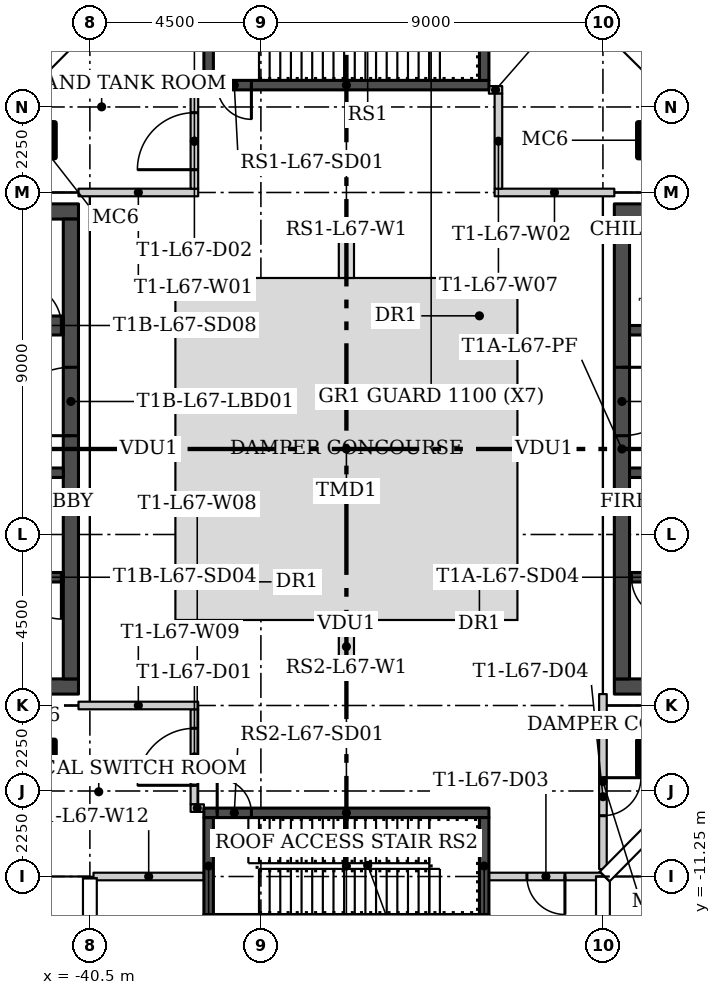
"""IFC4 building model, lengths in metres.
Left out: names, types, materials, properties, quantities, classifications, styles, units other than length and angle.
Written with IfcOpenShell. Run it as: python <this file> out.ifc"""

import sys

from ifc_helpers import new_model, si_unit, direction, frame, frame_2d, origin, origin_2d, place, context, subcontext, project, spatial, rectangle, hollow_rectangle, extrude, element, fill, save


model = new_model("IFC4")
c1 = context("Model", 3, precision=1e-05, world=origin(), true_north=direction((0.0, 1.0)))
c2 = subcontext(c1, "Body", "Model", "MODEL_VIEW")
j1 = project(units=[si_unit("LENGTHUNIT", "METRE"), si_unit("PLANEANGLEUNIT", "RADIAN")], contexts=[c1])
p1 = place(None, origin())
s1 = spatial("IfcSite", under=j1, at=p1, CompositionType="ELEMENT")
p2 = place(p1, origin())
s2 = spatial("IfcBuilding", under=s1, at=p2, CompositionType="ELEMENT")
p3 = place(p2, frame((0.0, 0.0, 278.3)))
s3 = spatial("IfcBuildingStorey", under=s2, at=p3, CompositionType="ELEMENT", Elevation=278.3)
for number, where in (
    (1, (-25.625, 8.125, 0.0)),
    (2, (-25.625, -8.125, 0.0)),
    (3, (-41.875, 8.125, 0.0)),
    (4, (-41.875, -8.125, 0.0)),
):
    element("IfcColumn", number, at=place(p3, frame(where)), inside=s3, PredefinedType="COLUMN", context=c2, shape_type="SweptSolid", body=[
        extrude(hollow_rectangle(XDim=0.9, YDim=0.9, WallThickness=0.036, at=origin_2d()), origin(), (0.0, 0.0, 1.0), 5.55),
    ])
for number, where in (
    (5, (-40.8, 6.75, 0.0)),
    (6, (-29.85, 6.75, 0.0)),
):
    element("IfcWall", number, at=place(p3, frame(where)), inside=s3, PredefinedType="PARTITIONING", context=c2, shape_type="SweptSolid", body=[
        extrude(rectangle(XDim=3.15, YDim=0.2, at=frame_2d((1.575, 0.0))), origin(), (0.0, 0.0, 1.0), 5.55),
    ])
p4 = place(p3, frame((-37.75, -9.35, 0.0), z_axis=(0.0, 0.0, 1.0), x_axis=(0.0, 1.0, 0.0)))
e7 = element("IfcWall", 7, at=p4, inside=s3, PredefinedType="PARTITIONING", context=c2, shape_type="SweptSolid", body=[
    extrude(rectangle(XDim=2.5, YDim=0.2, at=frame_2d((1.25, 0.0))), origin(), (0.0, 0.0, 1.0), 5.55),
])
p5 = place(p4, frame((0.5, 0.0, 0.0)))
e8 = element("IfcOpeningElement", 8, at=p5, cuts=e7, PredefinedType="OPENING", context=c2, shape_type="SweptSolid", body=[
    extrude(rectangle(XDim=1.5, YDim=2.4, at=frame_2d((0.75, 1.2))), frame((0.0, 0.11, 0.0), z_axis=(0.0, -1.0, 0.0), x_axis=(1.0, 0.0, 0.0)), (0.0, 0.0, 1.0), 0.22),
])
p6 = place(p3, frame((-37.75, 6.85, 0.0), z_axis=(0.0, 0.0, 1.0), x_axis=(0.0, 1.0, 0.0)))
e9 = element("IfcWall", 9, at=p6, inside=s3, PredefinedType="PARTITIONING", context=c2, shape_type="SweptSolid", body=[
    extrude(rectangle(XDim=2.5, YDim=0.2, at=frame_2d((1.25, 0.0))), origin(), (0.0, 0.0, 1.0), 5.55),
])
p7 = place(p6, frame((0.5, 0.0, 0.0)))
e10 = element("IfcOpeningElement", 10, at=p7, cuts=e9, PredefinedType="OPENING", context=c2, shape_type="SweptSolid", body=[
    extrude(rectangle(XDim=1.5, YDim=2.4, at=frame_2d((0.75, 1.2))), frame((0.0, 0.11, 0.0), z_axis=(0.0, -1.0, 0.0), x_axis=(1.0, 0.0, 0.0)), (0.0, 0.0, 1.0), 0.22),
])
for number, where in (
    (11, (-37.85, 9.45, 0.0)),
    (12, (-30.0, 9.45, 0.0)),
):
    element("IfcWall", number, at=place(p3, frame(where)), inside=s3, PredefinedType="PARTITIONING", context=c2, shape_type="SweptSolid", body=[
        extrude(rectangle(XDim=0.35, YDim=0.2, at=frame_2d((0.175, 0.0))), origin(), (0.0, 0.0, 1.0), 5.55),
    ])
p8 = place(p3, frame((-29.75, 9.35, 0.0), z_axis=(0.0, 0.0, 1.0), x_axis=(0.0, -1.0, 0.0)))
e13 = element("IfcWall", 13, at=p8, inside=s3, PredefinedType="PARTITIONING", context=c2, shape_type="SweptSolid", body=[
    extrude(rectangle(XDim=2.5, YDim=0.2, at=frame_2d((1.25, 0.0))), origin(), (0.0, 0.0, 1.0), 5.55),
])
p9 = place(p3, frame((-37.5, -9.45, 0.0), z_axis=(0.0, 0.0, 1.0), x_axis=(-1.0, 0.0, 0.0)))
e14 = element("IfcWall", 14, at=p9, inside=s3, PredefinedType="PARTITIONING", context=c2, shape_type="SweptSolid", body=[
    extrude(rectangle(XDim=0.35, YDim=0.2, at=frame_2d((0.175, 0.0))), origin(), (0.0, 0.0, 1.0), 5.55),
])
p10 = place(p3, frame((-37.65, -6.75, 0.0), z_axis=(0.0, 0.0, 1.0), x_axis=(-1.0, 0.0, 0.0)))
e15 = element("IfcWall", 15, at=p10, inside=s3, PredefinedType="PARTITIONING", context=c2, shape_type="SweptSolid", body=[
    extrude(rectangle(XDim=3.15, YDim=0.2, at=frame_2d((1.575, 0.0))), origin(), (0.0, 0.0, 1.0), 5.55),
])
p11 = place(p3, frame((-26.995, -11.25, 0.0), z_axis=(0.0, 0.0, 1.0), x_axis=(-1.0, 0.0, 0.0)))
e16 = element("IfcWall", 16, at=p11, inside=s3, PredefinedType="PARTITIONING", context=c2, shape_type="SweptSolid", body=[
    extrude(rectangle(XDim=3.005, YDim=0.2, at=frame_2d((1.502, 0.0))), origin(), (0.0, 0.0, 1.0), 5.55),
])
p12 = place(p11, frame((1.005, 0.0, 0.0)))
e17 = element("IfcOpeningElement", 17, at=p12, cuts=e16, PredefinedType="OPENING", context=c2, shape_type="SweptSolid", body=[
    extrude(rectangle(XDim=1.0, YDim=2.1, at=frame_2d((0.5, 1.05))), frame((0.0, 0.11, 0.0), z_axis=(0.0, -1.0, 0.0), x_axis=(1.0, 0.0, 0.0)), (0.0, 0.0, 1.0), 0.22),
])
p13 = place(p3, frame((-27.0, -6.45, 0.0), z_axis=(0.0, 0.0, 1.0), x_axis=(0.0, -1.0, 0.0)))
e18 = element("IfcWall", 18, at=p13, inside=s3, PredefinedType="PARTITIONING", context=c2, shape_type="SweptSolid", body=[
    extrude(rectangle(XDim=4.605, YDim=0.2, at=frame_2d((2.302, 0.0))), origin(), (0.0, 0.0, 1.0), 5.55),
])
p14 = place(p13, frame((2.2, 0.0, 0.0)))
e19 = element("IfcOpeningElement", 19, at=p14, cuts=e18, PredefinedType="OPENING", context=c2, shape_type="SweptSolid", body=[
    extrude(rectangle(XDim=1.0, YDim=2.1, at=frame_2d((0.5, 1.05))), frame((0.0, 0.11, 0.0), z_axis=(0.0, -1.0, 0.0), x_axis=(1.0, 0.0, 0.0)), (0.0, 0.0, 1.0), 0.22),
])
p15 = place(p3, frame((-40.405, -11.25, 0.0)))
e20 = element("IfcWall", 20, at=p15, inside=s3, PredefinedType="PARTITIONING", context=c2, shape_type="SweptSolid", body=[
    extrude(rectangle(XDim=2.905, YDim=0.2, at=frame_2d((1.453, 0.0))), origin(), (0.0, 0.0, 1.0), 5.55),
])
for number, where in (
    (21, (-26.7, -6.25, 0.0)),
    (22, (-26.7, 6.25, 0.0)),
):
    element("IfcWall", number, at=place(p3, frame(where)), inside=s3, PredefinedType="SHEAR", context=c2, shape_type="SweptSolid", body=[
        extrude(rectangle(XDim=12.9, YDim=0.4, at=frame_2d((6.45, 0.0))), origin(), (0.0, 0.0, 1.0), 5.55),
    ])
p16 = place(p3, frame((-26.5, 6.05, 0.0), z_axis=(0.0, 0.0, 1.0), x_axis=(0.0, -1.0, 0.0)))
e23 = element("IfcWall", 23, at=p16, inside=s3, PredefinedType="SHEAR", context=c2, shape_type="SweptSolid", body=[
    extrude(rectangle(XDim=12.1, YDim=0.4, at=frame_2d((6.05, 0.0))), origin(), (0.0, 0.0, 1.0), 5.55),
])
p17 = place(p16, frame((3.9, 0.0, 0.0)))
e24 = element("IfcOpeningElement", 24, at=p17, cuts=e23, PredefinedType="OPENING", context=c2, shape_type="SweptSolid", body=[
    extrude(rectangle(XDim=1.8, YDim=2.4, at=frame_2d((0.9, 1.2))), frame((0.0, 0.21, 0.0), z_axis=(0.0, -1.0, 0.0), x_axis=(1.0, 0.0, 0.0)), (0.0, 0.0, 1.0), 0.42),
])
p18 = place(p3, frame((-14.2, -3.375, 0.0), z_axis=(0.0, 0.0, 1.0), x_axis=(-1.0, 0.0, 0.0)))
e25 = element("IfcWall", 25, at=p18, inside=s3, PredefinedType="SHEAR", context=c2, shape_type="SweptSolid", body=[
    extrude(rectangle(XDim=12.1, YDim=0.25, at=frame_2d((6.05, 0.0))), origin(), (0.0, 0.0, 1.0), 5.55),
])
p19 = place(p18, frame((10.95, 0.0, 0.0)))
e26 = element("IfcOpeningElement", 26, at=p19, cuts=e25, PredefinedType="OPENING", context=c2, shape_type="SweptSolid", body=[
    extrude(rectangle(XDim=1.1, YDim=2.1, at=frame_2d((0.55, 1.05))), frame((0.0, 0.135, 0.0), z_axis=(0.0, -1.0, 0.0), x_axis=(1.0, 0.0, 0.0)), (0.0, 0.0, 1.0), 0.27),
])
p20 = place(p3, frame((-14.2, -0.625, 0.0), z_axis=(0.0, 0.0, 1.0), x_axis=(-1.0, 0.0, 0.0)))
e27 = element("IfcWall", 27, at=p20, inside=s3, PredefinedType="SHEAR", context=c2, shape_type="SweptSolid", body=[
    extrude(rectangle(XDim=12.1, YDim=0.25, at=frame_2d((6.05, 0.0))), origin(), (0.0, 0.0, 1.0), 5.55),
])
p21 = place(p20, frame((8.65, 0.0, 0.0)))
e28 = element("IfcOpeningElement", 28, at=p21, cuts=e27, PredefinedType="OPENING", context=c2, shape_type="SweptSolid", body=[
    extrude(rectangle(XDim=1.2, YDim=2.1, at=frame_2d((0.6, 1.05))), frame((0.0, 0.135, 0.0), z_axis=(0.0, -1.0, 0.0), x_axis=(1.0, 0.0, 0.0)), (0.0, 0.0, 1.0), 0.27),
])
p22 = place(p20, frame((1.175, 0.0, 0.0)))
e29 = element("IfcOpeningElement", 29, at=p22, cuts=e27, PredefinedType="OPENING", context=c2, shape_type="SweptSolid", body=[
    extrude(rectangle(XDim=0.9, YDim=2.1, at=frame_2d((0.45, 1.05))), frame((0.0, 0.135, 0.0), z_axis=(0.0, -1.0, 0.0), x_axis=(1.0, 0.0, 0.0)), (0.0, 0.0, 1.0), 0.27),
])
p23 = place(p3, frame((-26.3, 3.125, 0.0)))
e30 = element("IfcWall", 30, at=p23, inside=s3, PredefinedType="SHEAR", context=c2, shape_type="SweptSolid", body=[
    extrude(rectangle(XDim=12.1, YDim=0.25, at=frame_2d((6.05, 0.0))), origin(), (0.0, 0.0, 1.0), 5.55),
])
p24 = place(p23, frame((6.95, 0.0, 0.0)))
e31 = element("IfcOpeningElement", 31, at=p24, cuts=e30, PredefinedType="OPENING", context=c2, shape_type="SweptSolid", body=[
    extrude(rectangle(XDim=1.1, YDim=2.1, at=frame_2d((0.55, 1.05))), frame((0.0, 0.135, 0.0), z_axis=(0.0, -1.0, 0.0), x_axis=(1.0, 0.0, 0.0)), (0.0, 0.0, 1.0), 0.27),
])
p25 = place(p23, frame((10.075, 0.0, 0.0)))
e32 = element("IfcOpeningElement", 32, at=p25, cuts=e30, PredefinedType="OPENING", context=c2, shape_type="SweptSolid", body=[
    extrude(rectangle(XDim=1.1, YDim=2.1, at=frame_2d((0.55, 1.05))), frame((0.0, 0.135, 0.0), z_axis=(0.0, -1.0, 0.0), x_axis=(1.0, 0.0, 0.0)), (0.0, 0.0, 1.0), 0.27),
])
p26 = place(p23, frame((1.65, 0.0, 0.0)))
e33 = element("IfcOpeningElement", 33, at=p26, cuts=e30, PredefinedType="OPENING", context=c2, shape_type="SweptSolid", body=[
    extrude(rectangle(XDim=0.9, YDim=2.1, at=frame_2d((0.45, 1.05))), frame((0.0, 0.135, 0.0), z_axis=(0.0, -1.0, 0.0), x_axis=(1.0, 0.0, 0.0)), (0.0, 0.0, 1.0), 0.27),
])
p27 = place(p23, frame((4.575, 0.0, 0.0)))
e34 = element("IfcOpeningElement", 34, at=p27, cuts=e30, PredefinedType="OPENING", context=c2, shape_type="SweptSolid", body=[
    extrude(rectangle(XDim=0.9, YDim=2.1, at=frame_2d((0.45, 1.05))), frame((0.0, 0.135, 0.0), z_axis=(0.0, -1.0, 0.0), x_axis=(1.0, 0.0, 0.0)), (0.0, 0.0, 1.0), 0.27),
])
for number, where, z_axis, x_axis in (
    (35, (-40.8, -6.25, 0.0), (0.0, 0.0, 1.0), (-1.0, 0.0, 0.0)),
    (36, (-40.8, 6.25, 0.0), (0.0, 0.0, 1.0), (-1.0, 0.0, 0.0)),
):
    element("IfcWall", number, at=place(p3, frame(where, z_axis=z_axis, x_axis=x_axis)), inside=s3, PredefinedType="SHEAR", context=c2, shape_type="SweptSolid", body=[
        extrude(rectangle(XDim=12.9, YDim=0.4, at=frame_2d((6.45, 0.0))), origin(), (0.0, 0.0, 1.0), 5.55),
    ])
p28 = place(p3, frame((-41.0, -6.05, 0.0), z_axis=(0.0, 0.0, 1.0), x_axis=(0.0, 1.0, 0.0)))
e37 = element("IfcWall", 37, at=p28, inside=s3, PredefinedType="SHEAR", context=c2, shape_type="SweptSolid", body=[
    extrude(rectangle(XDim=12.1, YDim=0.4, at=frame_2d((6.05, 0.0))), origin(), (0.0, 0.0, 1.0), 5.55),
])
p29 = place(p28, frame((6.4, 0.0, 0.0)))
e38 = element("IfcOpeningElement", 38, at=p29, cuts=e37, PredefinedType="OPENING", context=c2, shape_type="SweptSolid", body=[
    extrude(rectangle(XDim=1.8, YDim=2.4, at=frame_2d((0.9, 1.2))), frame((0.0, 0.21, 0.0), z_axis=(0.0, -1.0, 0.0), x_axis=(1.0, 0.0, 0.0)), (0.0, 0.0, 1.0), 0.42),
])
p30 = place(p3, frame((-41.2, -3.375, 0.0), z_axis=(0.0, 0.0, 1.0), x_axis=(-1.0, 0.0, 0.0)))
e39 = element("IfcWall", 39, at=p30, inside=s3, PredefinedType="SHEAR", context=c2, shape_type="SweptSolid", body=[
    extrude(rectangle(XDim=12.1, YDim=0.25, at=frame_2d((6.05, 0.0))), origin(), (0.0, 0.0, 1.0), 5.55),
])
p31 = place(p30, frame((0.05, 0.0, 0.0)))
e40 = element("IfcOpeningElement", 40, at=p31, cuts=e39, PredefinedType="OPENING", context=c2, shape_type="SweptSolid", body=[
    extrude(rectangle(XDim=1.1, YDim=2.1, at=frame_2d((0.55, 1.05))), frame((0.0, 0.135, 0.0), z_axis=(0.0, -1.0, 0.0), x_axis=(1.0, 0.0, 0.0)), (0.0, 0.0, 1.0), 0.27),
])
p32 = place(p3, frame((-41.2, -0.625, 0.0), z_axis=(0.0, 0.0, 1.0), x_axis=(-1.0, 0.0, 0.0)))
e41 = element("IfcWall", 41, at=p32, inside=s3, PredefinedType="SHEAR", context=c2, shape_type="SweptSolid", body=[
    extrude(rectangle(XDim=12.1, YDim=0.25, at=frame_2d((6.05, 0.0))), origin(), (0.0, 0.0, 1.0), 5.55),
])
p33 = place(p32, frame((2.25, 0.0, 0.0)))
e42 = element("IfcOpeningElement", 42, at=p33, cuts=e41, PredefinedType="OPENING", context=c2, shape_type="SweptSolid", body=[
    extrude(rectangle(XDim=1.2, YDim=2.1, at=frame_2d((0.6, 1.05))), frame((0.0, 0.135, 0.0), z_axis=(0.0, -1.0, 0.0), x_axis=(1.0, 0.0, 0.0)), (0.0, 0.0, 1.0), 0.27),
])
p34 = place(p32, frame((10.025, 0.0, 0.0)))
e43 = element("IfcOpeningElement", 43, at=p34, cuts=e41, PredefinedType="OPENING", context=c2, shape_type="SweptSolid", body=[
    extrude(rectangle(XDim=0.9, YDim=2.1, at=frame_2d((0.45, 1.05))), frame((0.0, 0.135, 0.0), z_axis=(0.0, -1.0, 0.0), x_axis=(1.0, 0.0, 0.0)), (0.0, 0.0, 1.0), 0.27),
])
p35 = place(p3, frame((-48.5, 3.25, 0.0)))
e44 = element("IfcWall", 44, at=p35, inside=s3, PredefinedType="SHEAR", context=c2, shape_type="SweptSolid", body=[
    extrude(rectangle(XDim=7.3, YDim=0.5, at=frame_2d((3.65, 0.0))), origin(), (0.0, 0.0, 1.0), 5.55),
])
p36 = place(p35, frame((6.15, 0.0, 0.0)))
e45 = element("IfcOpeningElement", 45, at=p36, cuts=e44, PredefinedType="OPENING", context=c2, shape_type="SweptSolid", body=[
    extrude(rectangle(XDim=1.1, YDim=2.1, at=frame_2d((0.55, 1.05))), frame((0.0, 0.26, 0.0), z_axis=(0.0, -1.0, 0.0), x_axis=(1.0, 0.0, 0.0)), (0.0, 0.0, 1.0), 0.52),
])
p37 = place(p3, frame((-30.0, 9.575, 0.0), z_axis=(0.0, 0.0, 1.0), x_axis=(-1.0, 0.0, 0.0)))
e46 = element("IfcWall", 46, at=p37, inside=s3, PredefinedType="SHEAR", context=c2, shape_type="SweptSolid", body=[
    extrude(rectangle(XDim=7.5, YDim=0.25, at=frame_2d((3.75, 0.0))), origin(), (0.0, 0.0, 1.0), 5.55),
])
p38 = place(p37, frame((6.25, 0.0, 0.0)))
e47 = element("IfcOpeningElement", 47, at=p38, cuts=e46, PredefinedType="OPENING", context=c2, shape_type="SweptSolid", body=[
    extrude(rectangle(XDim=0.9, YDim=2.1, at=frame_2d((0.45, 1.05))), frame((0.0, 0.135, 0.0), z_axis=(0.0, -1.0, 0.0), x_axis=(1.0, 0.0, 0.0)), (0.0, 0.0, 1.0), 0.27),
])
for number, where, z_axis, x_axis in (
    (48, (-37.375, 9.7, 0.0), (0.0, 0.0, 1.0), (0.0, 1.0, 0.0)),
    (49, (-30.125, 9.7, 0.0), (0.0, 0.0, 1.0), (0.0, 1.0, 0.0)),
):
    element("IfcWall", number, at=place(p3, frame(where, z_axis=z_axis, x_axis=x_axis)), inside=s3, PredefinedType="SHEAR", context=c2, shape_type="SweptSolid", body=[
        extrude(rectangle(XDim=2.55, YDim=0.25, at=frame_2d((1.275, 0.0))), origin(), (0.0, 0.0, 1.0), 5.55),
    ])
p39 = place(p3, frame((-37.5, -9.575, 0.0)))
e50 = element("IfcWall", 50, at=p39, inside=s3, PredefinedType="SHEAR", context=c2, shape_type="SweptSolid", body=[
    extrude(rectangle(XDim=7.5, YDim=0.25, at=frame_2d((3.75, 0.0))), origin(), (0.0, 0.0, 1.0), 5.55),
])
p40 = place(p39, frame((0.35, 0.0, 0.0)))
e51 = element("IfcOpeningElement", 51, at=p40, cuts=e50, PredefinedType="OPENING", context=c2, shape_type="SweptSolid", body=[
    extrude(rectangle(XDim=0.9, YDim=2.1, at=frame_2d((0.45, 1.05))), frame((0.0, 0.135, 0.0), z_axis=(0.0, -1.0, 0.0), x_axis=(1.0, 0.0, 0.0)), (0.0, 0.0, 1.0), 0.27),
])
for number, where, z_axis, x_axis in (
    (52, (-37.375, -12.25, 0.0), (0.0, 0.0, 1.0), (0.0, 1.0, 0.0)),
    (53, (-30.125, -12.25, 0.0), (0.0, 0.0, 1.0), (0.0, 1.0, 0.0)),
):
    element("IfcWall", number, at=place(p3, frame(where, z_axis=z_axis, x_axis=x_axis)), inside=s3, PredefinedType="SHEAR", context=c2, shape_type="SweptSolid", body=[
        extrude(rectangle(XDim=2.55, YDim=0.25, at=frame_2d((1.275, 0.0))), origin(), (0.0, 0.0, 1.0), 5.55),
    ])
p41 = place(p5, origin())
e54 = element("IfcDoor", 54, at=p41, inside=s3, OperationType="DOUBLE_DOOR_SINGLE_SWING", PredefinedType="DOOR", context=c2, shape_type="SweptSolid", body=[
    extrude(rectangle(XDim=1.5, YDim=2.4, at=frame_2d((0.75, 1.2))), frame((0.0, 0.025, 0.0), z_axis=(0.0, -1.0, 0.0), x_axis=(1.0, 0.0, 0.0)), (0.0, 0.0, 1.0), 0.05),
])
fill(e8, e54)
p42 = place(p7, origin())
e55 = element("IfcDoor", 55, at=p42, inside=s3, OperationType="DOUBLE_DOOR_SINGLE_SWING", PredefinedType="DOOR", context=c2, shape_type="SweptSolid", body=[
    extrude(rectangle(XDim=1.5, YDim=2.4, at=frame_2d((0.75, 1.2))), frame((0.0, 0.025, 0.0), z_axis=(0.0, -1.0, 0.0), x_axis=(1.0, 0.0, 0.0)), (0.0, 0.0, 1.0), 0.05),
])
fill(e10, e55)
p43 = place(p12, origin())
e56 = element("IfcDoor", 56, at=p43, inside=s3, OperationType="SINGLE_SWING_LEFT", PredefinedType="DOOR", context=c2, shape_type="SweptSolid", body=[
    extrude(rectangle(XDim=1.0, YDim=2.1, at=frame_2d((0.5, 1.05))), frame((0.0, 0.025, 0.0), z_axis=(0.0, -1.0, 0.0), x_axis=(1.0, 0.0, 0.0)), (0.0, 0.0, 1.0), 0.05),
])
fill(e17, e56)
p44 = place(p14, origin())
e57 = element("IfcDoor", 57, at=p44, inside=s3, OperationType="SINGLE_SWING_RIGHT", PredefinedType="DOOR", context=c2, shape_type="SweptSolid", body=[
    extrude(rectangle(XDim=1.0, YDim=2.1, at=frame_2d((0.5, 1.05))), frame((0.0, 0.025, 0.0), z_axis=(0.0, -1.0, 0.0), x_axis=(1.0, 0.0, 0.0)), (0.0, 0.0, 1.0), 0.05),
])
fill(e19, e57)
p45 = place(p17, origin())
e58 = element("IfcDoor", 58, at=p45, inside=s3, OperationType="DOUBLE_DOOR_SINGLE_SWING", PredefinedType="DOOR", context=c2, shape_type="SweptSolid", body=[
    extrude(rectangle(XDim=1.8, YDim=2.4, at=frame_2d((0.9, 1.2))), frame((0.0, 0.025, 0.0), z_axis=(0.0, -1.0, 0.0), x_axis=(1.0, 0.0, 0.0)), (0.0, 0.0, 1.0), 0.05),
])
fill(e24, e58)
p46 = place(p19, origin())
e59 = element("IfcDoor", 59, at=p46, inside=s3, OperationType="SINGLE_SWING_RIGHT", PredefinedType="DOOR", context=c2, shape_type="SweptSolid", body=[
    extrude(rectangle(XDim=1.1, YDim=2.1, at=frame_2d((0.55, 1.05))), frame((0.0, 0.025, 0.0), z_axis=(0.0, -1.0, 0.0), x_axis=(1.0, 0.0, 0.0)), (0.0, 0.0, 1.0), 0.05),
])
fill(e26, e59)
p47 = place(p29, origin())
e60 = element("IfcDoor", 60, at=p47, inside=s3, OperationType="DOUBLE_DOOR_SINGLE_SWING", PredefinedType="DOOR", context=c2, shape_type="SweptSolid", body=[
    extrude(rectangle(XDim=1.8, YDim=2.4, at=frame_2d((0.9, 1.2))), frame((0.0, 0.025, 0.0), z_axis=(0.0, -1.0, 0.0), x_axis=(1.0, 0.0, 0.0)), (0.0, 0.0, 1.0), 0.05),
])
fill(e38, e60)
p48 = place(p31, origin())
e61 = element("IfcDoor", 61, at=p48, inside=s3, OperationType="SINGLE_SWING_LEFT", PredefinedType="DOOR", context=c2, shape_type="SweptSolid", body=[
    extrude(rectangle(XDim=1.1, YDim=2.1, at=frame_2d((0.55, 1.05))), frame((0.0, 0.025, 0.0), z_axis=(0.0, -1.0, 0.0), x_axis=(1.0, 0.0, 0.0)), (0.0, 0.0, 1.0), 0.05),
])
fill(e40, e61)
p49 = place(p36, origin())
e62 = element("IfcDoor", 62, at=p49, inside=s3, OperationType="SINGLE_SWING_RIGHT", PredefinedType="DOOR", context=c2, shape_type="SweptSolid", body=[
    extrude(rectangle(XDim=1.1, YDim=2.1, at=frame_2d((0.55, 1.05))), frame((0.0, 0.025, 0.0), z_axis=(0.0, -1.0, 0.0), x_axis=(1.0, 0.0, 0.0)), (0.0, 0.0, 1.0), 0.05),
])
fill(e45, e62)
p50 = place(p38, origin())
e63 = element("IfcDoor", 63, at=p50, inside=s3, OperationType="SINGLE_SWING_RIGHT", PredefinedType="DOOR", context=c2, shape_type="SweptSolid", body=[
    extrude(rectangle(XDim=0.9, YDim=2.1, at=frame_2d((0.45, 1.05))), frame((0.0, 0.025, 0.0), z_axis=(0.0, -1.0, 0.0), x_axis=(1.0, 0.0, 0.0)), (0.0, 0.0, 1.0), 0.05),
])
fill(e47, e63)
p51 = place(p40, origin())
e64 = element("IfcDoor", 64, at=p51, inside=s3, OperationType="SINGLE_SWING_LEFT", PredefinedType="DOOR", context=c2, shape_type="SweptSolid", body=[
    extrude(rectangle(XDim=0.9, YDim=2.1, at=frame_2d((0.45, 1.05))), frame((0.0, 0.025, 0.0), z_axis=(0.0, -1.0, 0.0), x_axis=(1.0, 0.0, 0.0)), (0.0, 0.0, 1.0), 0.05),
])
fill(e51, e64)
save(model, sys.argv[1])
